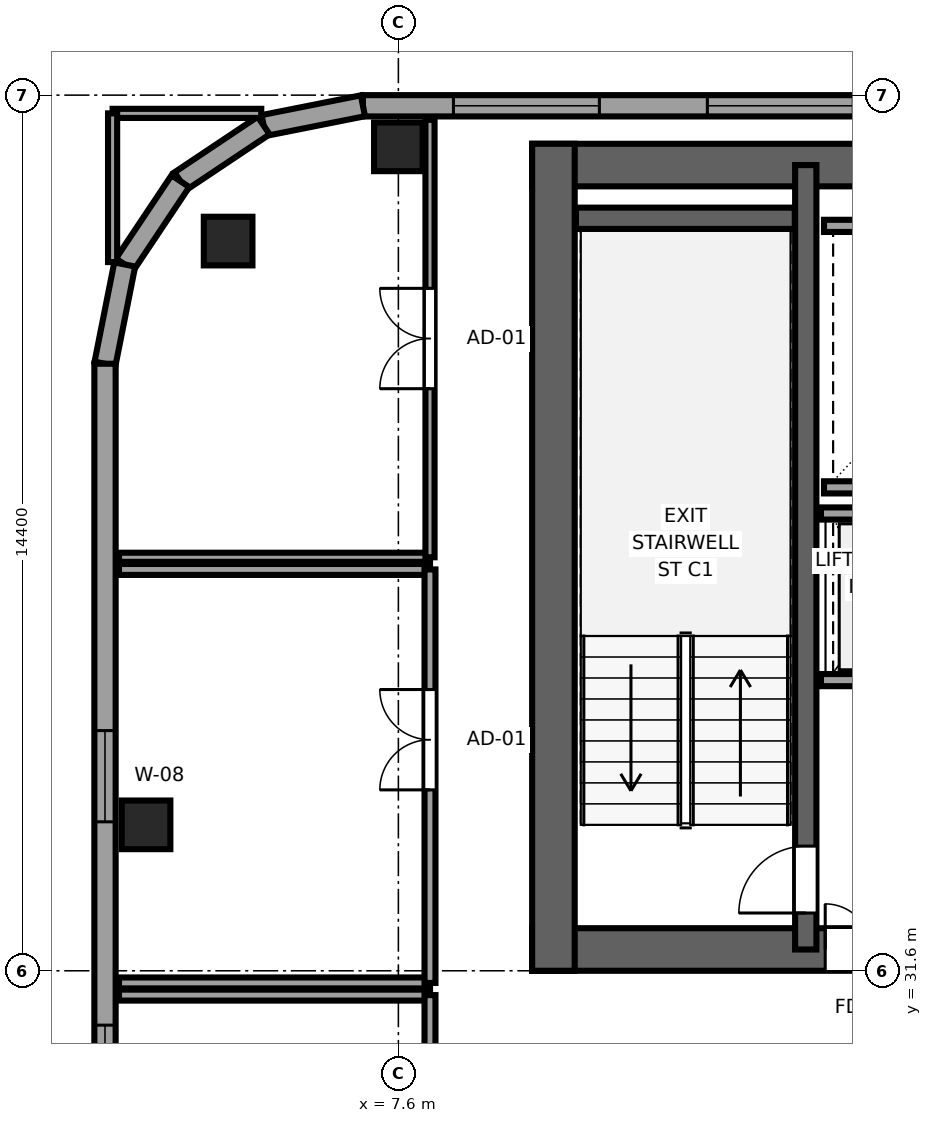
"""IFC4 building model, lengths in metres.
Left out: names, types, materials, properties, quantities, classifications, styles, units other than length and angle.
Written with IfcOpenShell. Run it as: python <this file> out.ifc"""

import sys

from ifc_helpers import new_model, si_unit, direction, frame, frame_2d, origin, origin_2d, place, context, subcontext, project, spatial, rectangle, extrude, source, transform, mapped, element, fill, save


model = new_model("IFC4")
c1 = context("Model", 3, precision=1e-05, world=origin(), true_north=direction((0.0, 1.0)))
c2 = subcontext(c1, "Body", "Model", "MODEL_VIEW")
j1 = project(units=[si_unit("LENGTHUNIT", "METRE"), si_unit("PLANEANGLEUNIT", "RADIAN")], contexts=[c1])
p1 = place(None, origin())
s1 = spatial("IfcSite", under=j1, at=p1, CompositionType="ELEMENT")
p2 = place(p1, origin())
s2 = spatial("IfcBuilding", under=s1, at=p2, CompositionType="ELEMENT")
p3 = place(p2, frame((0.0, 0.0, 168.35)))
s3 = spatial("IfcBuildingStorey", under=s2, at=p3, CompositionType="ELEMENT", Elevation=168.35)
p4 = place(p3, frame((9.8, 31.95, 0.0), z_axis=(0.0, 0.0, 1.0), x_axis=(1.0, 0.0, 0.0)))
e1 = element("IfcWall", 1, at=p4, inside=s3, PredefinedType="SHEAR", context=c2, shape_type="SweptSolid", body=[
    extrude(rectangle(XDim=26.4, YDim=0.7, at=frame_2d((13.2, 0.0))), origin(), (0.0, 0.0, 1.0), 3.55),
])
p5 = place(p4, frame((6.32, 0.0, 0.0), z_axis=(0.0, 0.0, 1.0), x_axis=(-1.0, 0.0, 0.0)))
e2 = element("IfcOpeningElement", 2, at=p5, cuts=e1, PredefinedType="OPENING", context=c2, shape_type="SweptSolid", body=[
    extrude(rectangle(XDim=1.5, YDim=2.04, at=frame_2d((0.75, 1.02))), frame((0.0, 0.36, 0.0), z_axis=(0.0, -1.0, 0.0), x_axis=(1.0, 0.0, 0.0)), (0.0, 0.0, 1.0), 0.72),
])
p6 = place(p4, frame((13.95, 0.0, 0.0), z_axis=(0.0, 0.0, 1.0), x_axis=(-1.0, 0.0, 0.0)))
e3 = element("IfcOpeningElement", 3, at=p6, cuts=e1, PredefinedType="OPENING", context=c2, shape_type="SweptSolid", body=[
    extrude(rectangle(XDim=1.5, YDim=2.04, at=frame_2d((0.75, 1.02))), frame((0.0, 0.36, 0.0), z_axis=(0.0, -1.0, 0.0), x_axis=(1.0, 0.0, 0.0)), (0.0, 0.0, 1.0), 0.72),
])
p7 = place(p4, frame((21.58, 0.0, 0.0), z_axis=(0.0, 0.0, 1.0), x_axis=(-1.0, 0.0, 0.0)))
e4 = element("IfcOpeningElement", 4, at=p7, cuts=e1, PredefinedType="OPENING", context=c2, shape_type="SweptSolid", body=[
    extrude(rectangle(XDim=1.5, YDim=2.04, at=frame_2d((0.75, 1.02))), frame((0.0, 0.36, 0.0), z_axis=(0.0, -1.0, 0.0), x_axis=(1.0, 0.0, 0.0)), (0.0, 0.0, 1.0), 0.72),
])
p8 = place(p4, frame((8.37, 0.0, 0.0), z_axis=(0.0, 0.0, 1.0), x_axis=(-1.0, 0.0, 0.0)))
e5 = element("IfcOpeningElement", 5, at=p8, cuts=e1, PredefinedType="OPENING", context=c2, shape_type="SweptSolid", body=[
    extrude(rectangle(XDim=0.82, YDim=2.01, at=frame_2d((0.41, 1.005))), frame((0.0, 0.36, 0.0), z_axis=(0.0, -1.0, 0.0), x_axis=(1.0, 0.0, 0.0)), (0.0, 0.0, 1.0), 0.72),
])
p9 = place(p4, frame((18.87, 0.0, 0.0), z_axis=(0.0, 0.0, 1.0), x_axis=(-1.0, 0.0, 0.0)))
e6 = element("IfcOpeningElement", 6, at=p9, cuts=e1, PredefinedType="OPENING", context=c2, shape_type="SweptSolid", body=[
    extrude(rectangle(XDim=0.82, YDim=2.01, at=frame_2d((0.41, 1.005))), frame((0.0, 0.36, 0.0), z_axis=(0.0, -1.0, 0.0), x_axis=(1.0, 0.0, 0.0)), (0.0, 0.0, 1.0), 0.72),
])
p10 = place(p3, frame((9.8, 44.85, 0.0), z_axis=(0.0, 0.0, 1.0), x_axis=(1.0, 0.0, 0.0)))
e7 = element("IfcWall", 7, at=p10, inside=s3, PredefinedType="SHEAR", context=c2, shape_type="SweptSolid", body=[
    extrude(rectangle(XDim=26.4, YDim=0.7, at=frame_2d((13.2, 0.0))), origin(), (0.0, 0.0, 1.0), 3.55),
])
p11 = place(p3, frame((10.15, 31.6, 0.0), z_axis=(0.0, 0.0, 1.0), x_axis=(0.0, 1.0, 0.0)))
e8 = element("IfcWall", 8, at=p11, inside=s3, PredefinedType="SHEAR", context=c2, shape_type="SweptSolid", body=[
    extrude(rectangle(XDim=13.6, YDim=0.7, at=frame_2d((6.8, 0.0))), origin(), (0.0, 0.0, 1.0), 3.55),
])
p12 = place(p3, frame((14.3, 31.95, 0.0), z_axis=(0.0, 0.0, 1.0), x_axis=(0.0, 1.0, 0.0)))
e9 = element("IfcWall", 9, at=p12, inside=s3, PredefinedType="SHEAR", context=c2, shape_type="SweptSolid", body=[
    extrude(rectangle(XDim=12.9, YDim=0.35, at=frame_2d((6.45, 0.0))), origin(), (0.0, 0.0, 1.0), 3.55),
])
p13 = place(p12, frame((0.6, 0.0, 0.0)))
e10 = element("IfcOpeningElement", 10, at=p13, cuts=e9, PredefinedType="OPENING", context=c2, shape_type="SweptSolid", body=[
    extrude(rectangle(XDim=1.1, YDim=2.12, at=frame_2d((0.55, 1.06))), frame((0.0, 0.185, 0.0), z_axis=(0.0, -1.0, 0.0), x_axis=(1.0, 0.0, 0.0)), (0.0, 0.0, 1.0), 0.37),
])
p14 = place(p3, frame((10.52, 43.975, 0.0), z_axis=(0.0, 0.0, 1.0), x_axis=(1.0, 0.0, 0.0)))
e11 = element("IfcWall", 11, at=p14, inside=s3, PredefinedType="SHEAR", context=c2, shape_type="SweptSolid", body=[
    extrude(rectangle(XDim=3.6, YDim=0.35, at=frame_2d((1.8, 0.0))), origin(), (0.0, 0.0, 1.0), 3.55),
])
m1 = source(origin(), c2, "Body", "SweptSolid", [
    extrude(rectangle(XDim=0.8, YDim=0.8, at=origin_2d()), origin(), (0.0, 0.0, 1.0), 3.55),
])
for number, where, z_axis, x_axis in (
    (12, (4.8, 43.6, 0.0), (0.0, 0.0, 1.0), (1.0, 0.0, 0.0)),
    (13, (7.6, 45.15, 0.0), (0.0, 0.0, 1.0), (1.0, 0.0, 0.0)),
    (14, (3.45, 34.0, 0.0), (0.0, 0.0, 1.0), (1.0, 0.0, 0.0)),
):
    element("IfcColumn", number, at=place(p3, frame(where, z_axis=z_axis, x_axis=x_axis)), inside=s3, PredefinedType="COLUMN", context=c2, shape_type="MappedRepresentation", body=[
        mapped(m1, transform((0.0, 0.0, 0.0), x_axis=(1.0, 0.0, 0.0), y_axis=(0.0, 1.0, 0.0), z_axis=(0.0, 0.0, 1.0), scale=1.0)),
    ])
p15 = place(p3, frame((49.983, 45.825, 0.0), z_axis=(0.0, 0.0, 1.0), x_axis=(-1.0, 0.0, 0.0)))
e15 = element("IfcWall", 15, at=p15, inside=s3, PredefinedType="SOLIDWALL", context=c2, shape_type="SweptSolid", body=[
    extrude(rectangle(XDim=42.966, YDim=0.35, at=frame_2d((21.483, 0.0))), origin(), (0.0, 0.0, 1.0), 3.37),
])
p16 = place(p15, frame((1.488, 0.0, 0.68)))
e16 = element("IfcOpeningElement", 16, at=p16, cuts=e15, PredefinedType="OPENING", context=c2, shape_type="SweptSolid", body=[
    extrude(rectangle(XDim=2.4, YDim=1.9, at=frame_2d((1.2, 0.95))), frame((0.0, 0.185, 0.0), z_axis=(0.0, -1.0, 0.0), x_axis=(1.0, 0.0, 0.0)), (0.0, 0.0, 1.0), 0.37),
])
p17 = place(p15, frame((9.841, 0.0, 0.68)))
e17 = element("IfcOpeningElement", 17, at=p17, cuts=e15, PredefinedType="OPENING", context=c2, shape_type="SweptSolid", body=[
    extrude(rectangle(XDim=2.4, YDim=1.9, at=frame_2d((1.2, 0.95))), frame((0.0, 0.185, 0.0), z_axis=(0.0, -1.0, 0.0), x_axis=(1.0, 0.0, 0.0)), (0.0, 0.0, 1.0), 0.37),
])
p18 = place(p15, frame((14.018, 0.0, 0.68)))
e18 = element("IfcOpeningElement", 18, at=p18, cuts=e15, PredefinedType="OPENING", context=c2, shape_type="SweptSolid", body=[
    extrude(rectangle(XDim=2.4, YDim=1.9, at=frame_2d((1.2, 0.95))), frame((0.0, 0.185, 0.0), z_axis=(0.0, -1.0, 0.0), x_axis=(1.0, 0.0, 0.0)), (0.0, 0.0, 1.0), 0.37),
])
p19 = place(p15, frame((18.195, 0.0, 0.68)))
e19 = element("IfcOpeningElement", 19, at=p19, cuts=e15, PredefinedType="OPENING", context=c2, shape_type="SweptSolid", body=[
    extrude(rectangle(XDim=2.4, YDim=1.9, at=frame_2d((1.2, 0.95))), frame((0.0, 0.185, 0.0), z_axis=(0.0, -1.0, 0.0), x_axis=(1.0, 0.0, 0.0)), (0.0, 0.0, 1.0), 0.37),
])
p20 = place(p15, frame((22.371, 0.0, 0.68)))
e20 = element("IfcOpeningElement", 20, at=p20, cuts=e15, PredefinedType="OPENING", context=c2, shape_type="SweptSolid", body=[
    extrude(rectangle(XDim=2.4, YDim=1.9, at=frame_2d((1.2, 0.95))), frame((0.0, 0.185, 0.0), z_axis=(0.0, -1.0, 0.0), x_axis=(1.0, 0.0, 0.0)), (0.0, 0.0, 1.0), 0.37),
])
p21 = place(p15, frame((26.548, 0.0, 0.68)))
e21 = element("IfcOpeningElement", 21, at=p21, cuts=e15, PredefinedType="OPENING", context=c2, shape_type="SweptSolid", body=[
    extrude(rectangle(XDim=2.4, YDim=1.9, at=frame_2d((1.2, 0.95))), frame((0.0, 0.185, 0.0), z_axis=(0.0, -1.0, 0.0), x_axis=(1.0, 0.0, 0.0)), (0.0, 0.0, 1.0), 0.37),
])
p22 = place(p15, frame((30.724, 0.0, 0.68)))
e22 = element("IfcOpeningElement", 22, at=p22, cuts=e15, PredefinedType="OPENING", context=c2, shape_type="SweptSolid", body=[
    extrude(rectangle(XDim=2.4, YDim=1.9, at=frame_2d((1.2, 0.95))), frame((0.0, 0.185, 0.0), z_axis=(0.0, -1.0, 0.0), x_axis=(1.0, 0.0, 0.0)), (0.0, 0.0, 1.0), 0.37),
])
p23 = place(p15, frame((34.901, 0.0, 0.68)))
e23 = element("IfcOpeningElement", 23, at=p23, cuts=e15, PredefinedType="OPENING", context=c2, shape_type="SweptSolid", body=[
    extrude(rectangle(XDim=2.4, YDim=1.9, at=frame_2d((1.2, 0.95))), frame((0.0, 0.185, 0.0), z_axis=(0.0, -1.0, 0.0), x_axis=(1.0, 0.0, 0.0)), (0.0, 0.0, 1.0), 0.37),
])
p24 = place(p15, frame((39.077, 0.0, 0.68)))
e24 = element("IfcOpeningElement", 24, at=p24, cuts=e15, PredefinedType="OPENING", context=c2, shape_type="SweptSolid", body=[
    extrude(rectangle(XDim=2.4, YDim=1.9, at=frame_2d((1.2, 0.95))), frame((0.0, 0.185, 0.0), z_axis=(0.0, -1.0, 0.0), x_axis=(1.0, 0.0, 0.0)), (0.0, 0.0, 1.0), 0.37),
])
p25 = place(p3, frame((7.017, 45.825, 0.0), z_axis=(0.0, 0.0, 1.0), x_axis=(-0.980788844421, -0.195072403631, 0.0)))
e25 = element("IfcWall", 25, at=p25, inside=s3, PredefinedType="SOLIDWALL", context=c2, shape_type="SweptSolid", body=[
    extrude(rectangle(XDim=1.665, YDim=0.35, at=frame_2d((0.832, 0.0))), origin(), (0.0, 0.0, 1.0), 3.37),
])
for number, where, z_axis, x_axis in (
    (26, (5.385, 45.5, 0.0), (0.0, 0.0, 1.0), (-0.832, -0.556, 0.0)),
    (27, (4.015, 44.585, 0.0), (0.0, 0.0, 1.0), (-0.556, -0.831, 0.0)),
):
    element("IfcWall", number, at=place(p3, frame(where, z_axis=z_axis, x_axis=x_axis)), inside=s3, PredefinedType="SOLIDWALL", context=c2, shape_type="SweptSolid", body=[
        extrude(rectangle(XDim=1.647, YDim=0.35, at=frame_2d((0.824, 0.0))), origin(), (0.0, 0.0, 1.0), 2.832),
    ])
p26 = place(p3, frame((3.1, 43.216, 0.0), z_axis=(0.0, 0.0, 1.0), x_axis=(-0.195044345786, -0.980794424524, 0.0)))
e28 = element("IfcWall", 28, at=p26, inside=s3, PredefinedType="SOLIDWALL", context=c2, shape_type="SweptSolid", body=[
    extrude(rectangle(XDim=1.665, YDim=0.35, at=frame_2d((0.833, 0.0))), origin(), (0.0, 0.0, 1.0), 3.37),
])
p27 = place(p3, frame((2.775, 41.583, 0.0), z_axis=(0.0, 0.0, 1.0), x_axis=(0.0, -1.0, 0.0)))
e29 = element("IfcWall", 29, at=p27, inside=s3, PredefinedType="SOLIDWALL", context=c2, shape_type="SweptSolid", body=[
    extrude(rectangle(XDim=34.566, YDim=0.35, at=frame_2d((17.283, 0.0))), origin(), (0.0, 0.0, 1.0), 3.37),
])
p28 = place(p27, frame((10.877, 0.0, 0.68)))
e30 = element("IfcOpeningElement", 30, at=p28, cuts=e29, PredefinedType="OPENING", context=c2, shape_type="SweptSolid", body=[
    extrude(rectangle(XDim=2.4, YDim=1.9, at=frame_2d((1.2, 0.95))), frame((0.0, 0.185, 0.0), z_axis=(0.0, -1.0, 0.0), x_axis=(1.0, 0.0, 0.0)), (0.0, 0.0, 1.0), 0.37),
])
p29 = place(p27, frame((13.997, 0.0, 0.68)))
e31 = element("IfcOpeningElement", 31, at=p29, cuts=e29, PredefinedType="OPENING", context=c2, shape_type="SweptSolid", body=[
    extrude(rectangle(XDim=2.4, YDim=1.9, at=frame_2d((1.2, 0.95))), frame((0.0, 0.185, 0.0), z_axis=(0.0, -1.0, 0.0), x_axis=(1.0, 0.0, 0.0)), (0.0, 0.0, 1.0), 0.37),
])
p30 = place(p27, frame((22.339, 0.0, 0.68)))
e32 = element("IfcOpeningElement", 32, at=p30, cuts=e29, PredefinedType="OPENING", context=c2, shape_type="SweptSolid", body=[
    extrude(rectangle(XDim=2.4, YDim=1.9, at=frame_2d((1.2, 0.95))), frame((0.0, 0.185, 0.0), z_axis=(0.0, -1.0, 0.0), x_axis=(1.0, 0.0, 0.0)), (0.0, 0.0, 1.0), 0.37),
])
p31 = place(p27, frame((27.06, 0.0, 0.68)))
e33 = element("IfcOpeningElement", 33, at=p31, cuts=e29, PredefinedType="OPENING", context=c2, shape_type="SweptSolid", body=[
    extrude(rectangle(XDim=2.4, YDim=1.9, at=frame_2d((1.2, 0.95))), frame((0.0, 0.185, 0.0), z_axis=(0.0, -1.0, 0.0), x_axis=(1.0, 0.0, 0.0)), (0.0, 0.0, 1.0), 0.37),
])
p32 = place(p27, frame((6.033, 0.0, 0.62)))
e34 = element("IfcOpeningElement", 34, at=p32, cuts=e29, PredefinedType="OPENING", context=c2, shape_type="SweptSolid", body=[
    extrude(rectangle(XDim=1.5, YDim=1.55, at=frame_2d((0.75, 0.775))), frame((0.0, 0.185, 0.0), z_axis=(0.0, -1.0, 0.0), x_axis=(1.0, 0.0, 0.0)), (0.0, 0.0, 1.0), 0.37),
])
for number, where, z_axis, x_axis in (
    (35, (14.6, 39.55, 0.0), (0.0, 0.0, 1.0), (1.0, 0.0, 0.0)),
    (36, (14.6, 43.85, 0.0), (0.0, 0.0, 1.0), (1.0, 0.0, 0.0)),
):
    element("IfcWall", number, at=place(p3, frame(where, z_axis=z_axis, x_axis=x_axis)), inside=s3, PredefinedType="SOLIDWALL", context=c2, shape_type="SweptSolid", body=[
        extrude(rectangle(XDim=4.1, YDim=0.2, at=frame_2d((2.05, 0.0))), origin(), (0.0, 0.0, 1.0), 3.37),
    ])
p33 = place(p3, frame((14.55, 36.38, 0.0), z_axis=(0.0, 0.0, 1.0), x_axis=(1.0, 0.0, 0.0)))
e37 = element("IfcWall", 37, at=p33, inside=s3, PredefinedType="SOLIDWALL", context=c2, shape_type="SweptSolid", body=[
    extrude(rectangle(XDim=4.075, YDim=0.2, at=frame_2d((2.038, 0.0))), origin(), (0.0, 0.0, 1.0), 3.37),
])
p34 = place(p33, frame((0.55, 0.0, 0.0)))
e38 = element("IfcOpeningElement", 38, at=p34, cuts=e37, PredefinedType="OPENING", context=c2, shape_type="SweptSolid", body=[
    extrude(rectangle(XDim=1.1, YDim=2.12, at=frame_2d((0.55, 1.06))), frame((0.0, 0.11, 0.0), z_axis=(0.0, -1.0, 0.0), x_axis=(1.0, 0.0, 0.0)), (0.0, 0.0, 1.0), 0.22),
])
p35 = place(p33, frame((2.45, 0.0, 0.0)))
e39 = element("IfcOpeningElement", 39, at=p35, cuts=e37, PredefinedType="OPENING", context=c2, shape_type="SweptSolid", body=[
    extrude(rectangle(XDim=1.1, YDim=2.12, at=frame_2d((0.55, 1.06))), frame((0.0, 0.11, 0.0), z_axis=(0.0, -1.0, 0.0), x_axis=(1.0, 0.0, 0.0)), (0.0, 0.0, 1.0), 0.22),
])
p36 = place(p3, frame((14.55, 39.12, 0.0), z_axis=(0.0, 0.0, 1.0), x_axis=(1.0, 0.0, 0.0)))
e40 = element("IfcWall", 40, at=p36, inside=s3, PredefinedType="SOLIDWALL", context=c2, shape_type="SweptSolid", body=[
    extrude(rectangle(XDim=4.075, YDim=0.2, at=frame_2d((2.038, 0.0))), origin(), (0.0, 0.0, 1.0), 3.37),
])
p37 = place(p3, frame((3.005, 31.2, 0.0), z_axis=(0.0, 0.0, 1.0), x_axis=(1.0, 0.0, 0.0)))
e41 = element("IfcWall", 41, at=p37, inside=s3, PredefinedType="PARTITIONING", context=c2, shape_type="SweptSolid", body=[
    extrude(rectangle(XDim=5.115, YDim=0.18, at=frame_2d((2.558, 0.0))), origin(), (0.0, 0.0, 1.0), 3.37),
])
p38 = place(p3, frame((8.12, 23.1, 0.0), z_axis=(0.0, 0.0, 1.0), x_axis=(0.0, 1.0, 0.0)))
e42 = element("IfcWall", 42, at=p38, inside=s3, PredefinedType="PARTITIONING", context=c2, shape_type="SweptSolid", body=[
    extrude(rectangle(XDim=8.1, YDim=0.18, at=frame_2d((4.05, 0.0))), origin(), (0.0, 0.0, 1.0), 3.37),
])
p39 = place(p38, frame((3.225, 0.0, 0.0)))
e43 = element("IfcOpeningElement", 43, at=p39, cuts=e42, PredefinedType="OPENING", context=c2, shape_type="SweptSolid", body=[
    extrude(rectangle(XDim=1.65, YDim=2.15, at=frame_2d((0.825, 1.075))), frame((0.0, 0.1, 0.0), z_axis=(0.0, -1.0, 0.0), x_axis=(1.0, 0.0, 0.0)), (0.0, 0.0, 1.0), 0.2),
])
for number, where, z_axis, x_axis in (
    (44, (3.005, 31.4, 0.0), (0.0, 0.0, 1.0), (1.0, 0.0, 0.0)),
    (45, (3.005, 38.2, 0.0), (0.0, 0.0, 1.0), (1.0, 0.0, 0.0)),
):
    element("IfcWall", number, at=place(p3, frame(where, z_axis=z_axis, x_axis=x_axis)), inside=s3, PredefinedType="PARTITIONING", context=c2, shape_type="SweptSolid", body=[
        extrude(rectangle(XDim=5.115, YDim=0.18, at=frame_2d((2.558, 0.0))), origin(), (0.0, 0.0, 1.0), 3.37),
    ])
p40 = place(p3, frame((8.12, 31.4, 0.0), z_axis=(0.0, 0.0, 1.0), x_axis=(0.0, 1.0, 0.0)))
e46 = element("IfcWall", 46, at=p40, inside=s3, PredefinedType="PARTITIONING", context=c2, shape_type="SweptSolid", body=[
    extrude(rectangle(XDim=6.8, YDim=0.18, at=frame_2d((3.4, 0.0))), origin(), (0.0, 0.0, 1.0), 3.37),
])
p41 = place(p40, frame((3.175, 0.0, 0.0)))
e47 = element("IfcOpeningElement", 47, at=p41, cuts=e46, PredefinedType="OPENING", context=c2, shape_type="SweptSolid", body=[
    extrude(rectangle(XDim=1.65, YDim=2.15, at=frame_2d((0.825, 1.075))), frame((0.0, 0.1, 0.0), z_axis=(0.0, -1.0, 0.0), x_axis=(1.0, 0.0, 0.0)), (0.0, 0.0, 1.0), 0.2),
])
p42 = place(p3, frame((3.005, 38.4, 0.0), z_axis=(0.0, 0.0, 1.0), x_axis=(1.0, 0.0, 0.0)))
e48 = element("IfcWall", 48, at=p42, inside=s3, PredefinedType="PARTITIONING", context=c2, shape_type="SweptSolid", body=[
    extrude(rectangle(XDim=5.115, YDim=0.15, at=frame_2d((2.558, 0.0))), origin(), (0.0, 0.0, 1.0), 3.37),
])
for number, where, z_axis, x_axis in (
    (49, (2.9, 45.7, 0.0), (0.0, 0.0, 1.0), (1.0, 0.0, 0.0)),
    (50, (2.9, 43.255, 0.0), (0.0, 0.0, 1.0), (0.0, 1.0, 0.0)),
):
    element("IfcWall", number, at=place(p3, frame(where, z_axis=z_axis, x_axis=x_axis)), inside=s3, PredefinedType="PARTITIONING", context=c2, shape_type="SweptSolid", body=[
        extrude(rectangle(XDim=2.445, YDim=0.15, at=frame_2d((1.223, 0.0))), origin(), (0.0, 0.0, 1.0), 3.37),
    ])
p43 = place(p3, frame((8.12, 38.4, 0.0), z_axis=(0.0, 0.0, 1.0), x_axis=(0.0, 1.0, 0.0)))
e51 = element("IfcWall", 51, at=p43, inside=s3, PredefinedType="PARTITIONING", context=c2, shape_type="SweptSolid", body=[
    extrude(rectangle(XDim=7.195, YDim=0.15, at=frame_2d((3.598, 0.0))), origin(), (0.0, 0.0, 1.0), 3.37),
])
p44 = place(p43, frame((2.772, 0.0, 0.0)))
e52 = element("IfcOpeningElement", 52, at=p44, cuts=e51, PredefinedType="OPENING", context=c2, shape_type="SweptSolid", body=[
    extrude(rectangle(XDim=1.65, YDim=2.15, at=frame_2d((0.825, 1.075))), frame((0.0, 0.085, 0.0), z_axis=(0.0, -1.0, 0.0), x_axis=(1.0, 0.0, 0.0)), (0.0, 0.0, 1.0), 0.17),
])
m2 = source(origin(), c2, "Body", "SweptSolid", [
    extrude(rectangle(XDim=2.4, YDim=1.9, at=frame_2d((1.2, 0.95))), frame((0.0, 0.09, 0.0), z_axis=(0.0, -1.0, 0.0), x_axis=(1.0, 0.0, 0.0)), (0.0, 0.0, 1.0), 0.06),
])
p45 = place(p23, origin())
e53 = element("IfcWindow", 53, at=p45, inside=s3, PartitioningType="TRIPLE_PANEL_HORIZONTAL", PredefinedType="WINDOW", context=c2, shape_type="MappedRepresentation", body=[
    mapped(m2, transform((0.0, 0.0, 0.0), x_axis=(1.0, 0.0, 0.0), y_axis=(0.0, 1.0, 0.0), z_axis=(0.0, 0.0, 1.0), scale=1.0)),
])
fill(e23, e53)
p46 = place(p24, origin())
e54 = element("IfcWindow", 54, at=p46, inside=s3, PartitioningType="TRIPLE_PANEL_HORIZONTAL", PredefinedType="WINDOW", context=c2, shape_type="MappedRepresentation", body=[
    mapped(m2, transform((0.0, 0.0, 0.0), x_axis=(1.0, 0.0, 0.0), y_axis=(0.0, 1.0, 0.0), z_axis=(0.0, 0.0, 1.0), scale=1.0)),
])
fill(e24, e54)
p47 = place(p28, origin())
e55 = element("IfcWindow", 55, at=p47, inside=s3, PartitioningType="TRIPLE_PANEL_HORIZONTAL", PredefinedType="WINDOW", context=c2, shape_type="MappedRepresentation", body=[
    mapped(m2, transform((0.0, 0.0, 0.0), x_axis=(1.0, 0.0, 0.0), y_axis=(0.0, 1.0, 0.0), z_axis=(0.0, 0.0, 1.0), scale=1.0)),
])
fill(e30, e55)
m3 = source(origin(), c2, "Body", "SweptSolid", [
    extrude(rectangle(XDim=1.5, YDim=1.55, at=frame_2d((0.75, 0.775))), frame((0.0, 0.09, 0.0), z_axis=(0.0, -1.0, 0.0), x_axis=(1.0, 0.0, 0.0)), (0.0, 0.0, 1.0), 0.06),
])
p48 = place(p32, origin())
e56 = element("IfcWindow", 56, at=p48, inside=s3, PartitioningType="SINGLE_PANEL", PredefinedType="WINDOW", context=c2, shape_type="MappedRepresentation", body=[
    mapped(m3, transform((0.0, 0.0, 0.0), x_axis=(1.0, 0.0, 0.0), y_axis=(0.0, 1.0, 0.0), z_axis=(0.0, 0.0, 1.0), scale=1.0)),
])
fill(e34, e56)
m4 = source(origin(), c2, "Body", "SweptSolid", [
    extrude(rectangle(XDim=1.1, YDim=2.12, at=frame_2d((0.55, 1.06))), frame((0.0, 0.025, 0.0), z_axis=(0.0, -1.0, 0.0), x_axis=(1.0, 0.0, 0.0)), (0.0, 0.0, 1.0), 0.05),
])
p49 = place(p13, origin())
e57 = element("IfcDoor", 57, at=p49, inside=s3, OperationType="SINGLE_SWING_LEFT", PredefinedType="DOOR", context=c2, shape_type="MappedRepresentation", body=[
    mapped(m4, transform((0.0, 0.0, 0.0), x_axis=(1.0, 0.0, 0.0), y_axis=(0.0, 1.0, 0.0), z_axis=(0.0, 0.0, 1.0), scale=1.0)),
])
fill(e10, e57)
m5 = source(origin(), c2, "Body", "SweptSolid", [
    extrude(rectangle(XDim=1.5, YDim=2.04, at=frame_2d((0.75, 1.02))), frame((0.0, 0.025, 0.0), z_axis=(0.0, -1.0, 0.0), x_axis=(1.0, 0.0, 0.0)), (0.0, 0.0, 1.0), 0.05),
])
p50 = place(p5, origin())
e58 = element("IfcDoor", 58, at=p50, inside=s3, OperationType="DOUBLE_DOOR_SINGLE_SWING", PredefinedType="DOOR", context=c2, shape_type="MappedRepresentation", body=[
    mapped(m5, transform((0.0, 0.0, 0.0), x_axis=(1.0, 0.0, 0.0), y_axis=(0.0, 1.0, 0.0), z_axis=(0.0, 0.0, 1.0), scale=1.0)),
])
fill(e2, e58)
m6 = source(origin(), c2, "Body", "SweptSolid", [
    extrude(rectangle(XDim=1.65, YDim=2.15, at=frame_2d((0.825, 1.075))), frame((0.0, 0.025, 0.0), z_axis=(0.0, -1.0, 0.0), x_axis=(1.0, 0.0, 0.0)), (0.0, 0.0, 1.0), 0.05),
])
p51 = place(p41, origin())
e59 = element("IfcDoor", 59, at=p51, inside=s3, OperationType="DOUBLE_DOOR_SINGLE_SWING", PredefinedType="DOOR", context=c2, shape_type="MappedRepresentation", body=[
    mapped(m6, transform((0.0, 0.0, 0.0), x_axis=(1.0, 0.0, 0.0), y_axis=(0.0, 1.0, 0.0), z_axis=(0.0, 0.0, 1.0), scale=1.0)),
])
fill(e47, e59)
p52 = place(p44, origin())
e60 = element("IfcDoor", 60, at=p52, inside=s3, OperationType="DOUBLE_DOOR_SINGLE_SWING", PredefinedType="DOOR", context=c2, shape_type="MappedRepresentation", body=[
    mapped(m6, transform((0.0, 0.0, 0.0), x_axis=(1.0, 0.0, 0.0), y_axis=(0.0, 1.0, 0.0), z_axis=(0.0, 0.0, 1.0), scale=1.0)),
])
fill(e52, e60)
save(model, sys.argv[1])
